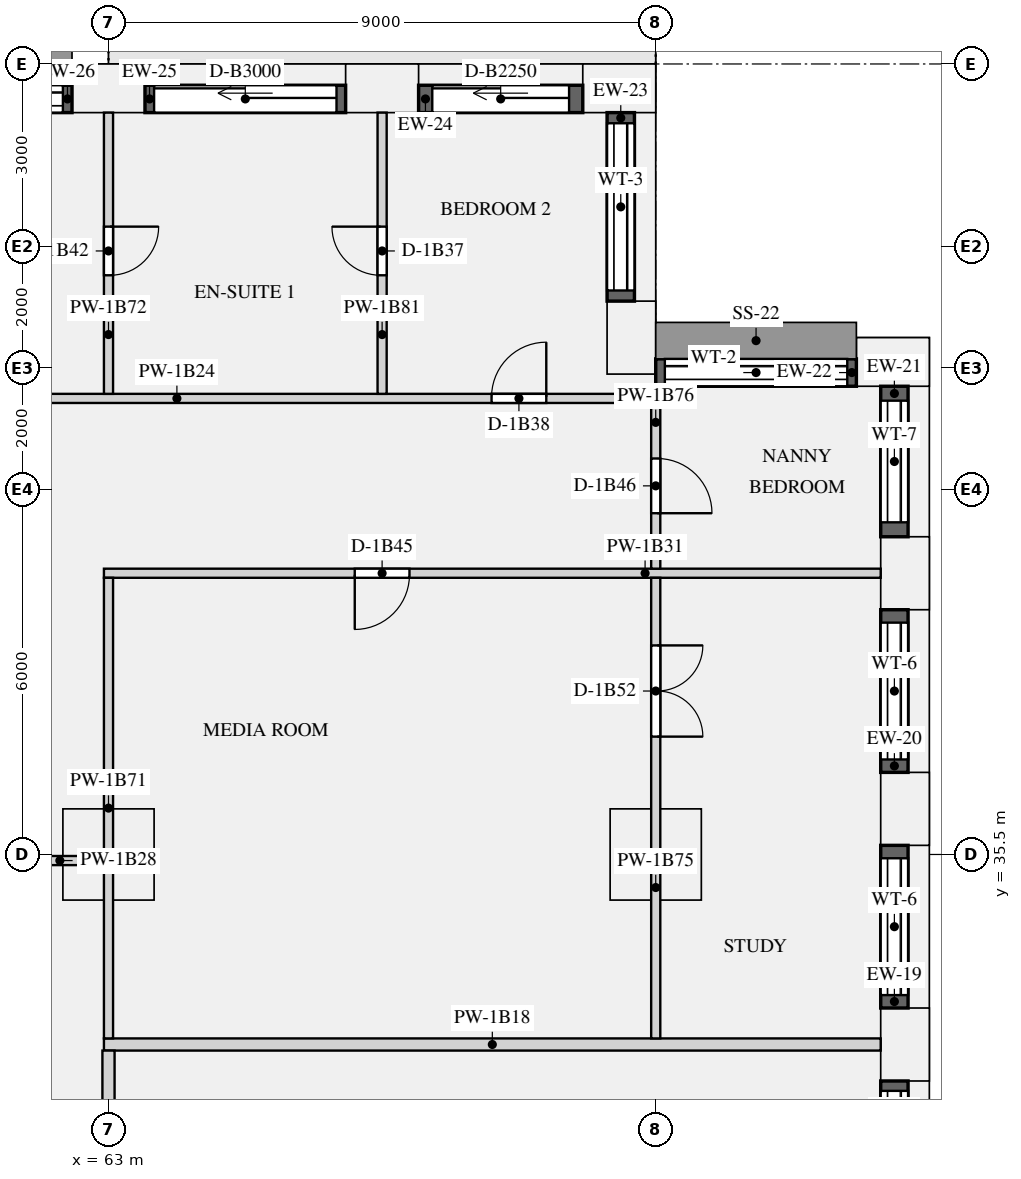
"""IFC4 building model, lengths in metres.
Left out: names, types, materials, properties, quantities, classifications, styles, units other than length and angle.
Written with IfcOpenShell. Run it as: python <this file> out.ifc"""

import sys

from ifc_helpers import new_model, si_unit, direction, frame, frame_2d, origin, origin_2d, place, context, subcontext, project, spatial, rectangle, extrude, element, fill, save


model = new_model("IFC4")
c1 = context("Model", 3, precision=1e-05, world=origin(), true_north=direction((0.0, 1.0)))
c2 = subcontext(c1, "Body", "Model", "MODEL_VIEW")
j1 = project(units=[si_unit("LENGTHUNIT", "METRE"), si_unit("PLANEANGLEUNIT", "RADIAN")], contexts=[c1])
p1 = place(None, origin())
s1 = spatial("IfcSite", under=j1, at=p1, CompositionType="ELEMENT")
p2 = place(p1, origin())
s2 = spatial("IfcBuilding", under=s1, at=p2, CompositionType="ELEMENT")
p3 = place(p2, frame((0.0, 0.0, 28.95)))
s3 = spatial("IfcBuildingStorey", under=s2, at=p3, CompositionType="ELEMENT", Elevation=28.95)
for number, where, z_axis, x_axis in (
    (1, (76.1, 32.375, 0.0), (0.0, 0.0, 1.0), (0.0, 1.0, 0.0)),
    (2, (76.1, 36.25, 0.0), (0.0, 0.0, 1.0), (0.0, 1.0, 0.0)),
    (3, (76.1, 40.125, 0.0), (0.0, 0.0, 1.0), (0.0, 1.0, 0.0)),
    (4, (75.9, 43.6, 0.0), (0.0, 0.0, 1.0), (-1.0, 0.0, 0.0)),
    (5, (71.6, 44.0, 0.0), (0.0, 0.0, 1.0), (0.0, 1.0, 0.0)),
    (6, (71.4, 48.1, 0.0), (0.0, 0.0, 1.0), (-1.0, 0.0, 0.0)),
    (7, (67.5, 48.1, 0.0), (0.0, 0.0, 1.0), (-1.0, 0.0, 0.0)),
    (8, (63.0, 48.1, 0.0), (0.0, 0.0, 1.0), (-1.0, 0.0, 0.0)),
):
    element("IfcColumn", number, at=place(p3, frame(where, z_axis=z_axis, x_axis=x_axis)), inside=s3, PredefinedType="USERDEFINED", context=c2, shape_type="SweptSolid", body=[
        extrude(rectangle(XDim=1.2, YDim=0.8, at=origin_2d()), origin(), (0.0, 0.0, 1.0), 3.15),
    ])
for number, where, z_axis, x_axis in (
    (9, (63.0, 35.5, 0.0), (0.0, 0.0, 1.0), (1.0, 0.0, 0.0)),
    (10, (72.0, 35.5, 0.0), (0.0, 0.0, 1.0), (1.0, 0.0, 0.0)),
):
    element("IfcColumn", number, at=place(p3, frame(where, z_axis=z_axis, x_axis=x_axis)), inside=s3, PredefinedType="COLUMN", context=c2, shape_type="SweptSolid", body=[
        extrude(rectangle(XDim=1.5, YDim=1.5, at=origin_2d()), origin(), (0.0, 0.0, 1.0), 3.15),
    ])
p4 = place(p3, frame((75.925, 29.7, 0.9), z_axis=(0.0, 0.0, 1.0), x_axis=(0.0, 1.0, 0.0)))
e11 = element("IfcWall", 11, at=p4, inside=s3, PredefinedType="SOLIDWALL", context=c2, shape_type="SweptSolid", body=[
    extrude(rectangle(XDim=2.075, YDim=0.45, at=frame_2d((1.038, 0.0))), origin(), (0.0, 0.0, 1.0), 1.93),
])
p5 = place(p4, frame((0.163, 0.0, 0.15)))
e12 = element("IfcOpeningElement", 12, at=p5, cuts=e11, PredefinedType="OPENING", context=c2, shape_type="SweptSolid", body=[
    extrude(rectangle(XDim=1.75, YDim=1.5, at=frame_2d((0.875, 0.75))), frame((0.0, 0.235, 0.0), z_axis=(0.0, -1.0, 0.0), x_axis=(1.0, 0.0, 0.0)), (0.0, 0.0, 1.0), 0.47),
])
p6 = place(p3, frame((75.925, 32.975, 0.9), z_axis=(0.0, 0.0, 1.0), x_axis=(0.0, 1.0, 0.0)))
e13 = element("IfcWall", 13, at=p6, inside=s3, PredefinedType="SOLIDWALL", context=c2, shape_type="SweptSolid", body=[
    extrude(rectangle(XDim=2.675, YDim=0.45, at=frame_2d((1.337, 0.0))), origin(), (0.0, 0.0, 1.0), 1.93),
])
p7 = place(p6, frame((0.212, 0.0, 0.15)))
e14 = element("IfcOpeningElement", 14, at=p7, cuts=e13, PredefinedType="OPENING", context=c2, shape_type="SweptSolid", body=[
    extrude(rectangle(XDim=2.25, YDim=1.5, at=frame_2d((1.125, 0.75))), frame((0.0, 0.235, 0.0), z_axis=(0.0, -1.0, 0.0), x_axis=(1.0, 0.0, 0.0)), (0.0, 0.0, 1.0), 0.47),
])
p8 = place(p3, frame((75.925, 36.85, 0.9), z_axis=(0.0, 0.0, 1.0), x_axis=(0.0, 1.0, 0.0)))
e15 = element("IfcWall", 15, at=p8, inside=s3, PredefinedType="SOLIDWALL", context=c2, shape_type="SweptSolid", body=[
    extrude(rectangle(XDim=2.675, YDim=0.45, at=frame_2d((1.337, 0.0))), origin(), (0.0, 0.0, 1.0), 1.93),
])
p9 = place(p8, frame((0.212, 0.0, 0.15)))
e16 = element("IfcOpeningElement", 16, at=p9, cuts=e15, PredefinedType="OPENING", context=c2, shape_type="SweptSolid", body=[
    extrude(rectangle(XDim=2.25, YDim=1.5, at=frame_2d((1.125, 0.75))), frame((0.0, 0.235, 0.0), z_axis=(0.0, -1.0, 0.0), x_axis=(1.0, 0.0, 0.0)), (0.0, 0.0, 1.0), 0.47),
])
p10 = place(p3, frame((75.925, 40.725, 0.9), z_axis=(0.0, 0.0, 1.0), x_axis=(0.0, 1.0, 0.0)))
e17 = element("IfcWall", 17, at=p10, inside=s3, PredefinedType="SOLIDWALL", context=c2, shape_type="SweptSolid", body=[
    extrude(rectangle(XDim=2.475, YDim=0.45, at=frame_2d((1.237, 0.0))), origin(), (0.0, 0.0, 1.0), 1.93),
])
p11 = place(p10, frame((0.238, 0.0, 0.15)))
e18 = element("IfcOpeningElement", 18, at=p11, cuts=e17, PredefinedType="OPENING", context=c2, shape_type="SweptSolid", body=[
    extrude(rectangle(XDim=2.0, YDim=1.5, at=frame_2d((1.0, 0.75))), frame((0.0, 0.235, 0.0), z_axis=(0.0, -1.0, 0.0), x_axis=(1.0, 0.0, 0.0)), (0.0, 0.0, 1.0), 0.47),
])
p12 = place(p3, frame((75.3, 43.425, 0.9), z_axis=(0.0, 0.0, 1.0), x_axis=(-1.0, 0.0, 0.0)))
e19 = element("IfcWall", 19, at=p12, inside=s3, PredefinedType="SOLIDWALL", context=c2, shape_type="SweptSolid", body=[
    extrude(rectangle(XDim=3.3, YDim=0.45, at=frame_2d((1.65, 0.0))), origin(), (0.0, 0.0, 1.0), 1.93),
])
p13 = place(p12, frame((0.15, 0.0, 0.15)))
e20 = element("IfcOpeningElement", 20, at=p13, cuts=e19, PredefinedType="OPENING", context=c2, shape_type="SweptSolid", body=[
    extrude(rectangle(XDim=3.0, YDim=1.5, at=frame_2d((1.5, 0.75))), frame((0.0, 0.235, 0.0), z_axis=(0.0, -1.0, 0.0), x_axis=(1.0, 0.0, 0.0)), (0.0, 0.0, 1.0), 0.47),
])
p14 = place(p3, frame((71.425, 44.6, 0.9), z_axis=(0.0, 0.0, 1.0), x_axis=(0.0, 1.0, 0.0)))
e21 = element("IfcWall", 21, at=p14, inside=s3, PredefinedType="SOLIDWALL", context=c2, shape_type="SweptSolid", body=[
    extrude(rectangle(XDim=3.1, YDim=0.45, at=frame_2d((1.55, 0.0))), origin(), (0.0, 0.0, 1.0), 1.93),
])
p15 = place(p14, frame((0.175, 0.0, 0.15)))
e22 = element("IfcOpeningElement", 22, at=p15, cuts=e21, PredefinedType="OPENING", context=c2, shape_type="SweptSolid", body=[
    extrude(rectangle(XDim=2.75, YDim=1.5, at=frame_2d((1.375, 0.75))), frame((0.0, 0.235, 0.0), z_axis=(0.0, -1.0, 0.0), x_axis=(1.0, 0.0, 0.0)), (0.0, 0.0, 1.0), 0.47),
])
p16 = place(p3, frame((70.8, 47.925, 0.0), z_axis=(0.0, 0.0, 1.0), x_axis=(-1.0, 0.0, 0.0)))
e23 = element("IfcWall", 23, at=p16, inside=s3, PredefinedType="SOLIDWALL", context=c2, shape_type="SweptSolid", body=[
    extrude(rectangle(XDim=2.7, YDim=0.45, at=frame_2d((1.35, 0.0))), origin(), (0.0, 0.0, 1.0), 2.83),
])
p17 = place(p16, frame((0.225, 0.0, 0.0)))
e24 = element("IfcOpeningElement", 24, at=p17, cuts=e23, PredefinedType="OPENING", context=c2, shape_type="SweptSolid", body=[
    extrude(rectangle(XDim=2.25, YDim=2.3, at=frame_2d((1.125, 1.15))), frame((0.0, 0.235, 0.0), z_axis=(0.0, -1.0, 0.0), x_axis=(1.0, 0.0, 0.0)), (0.0, 0.0, 1.0), 0.47),
])
p18 = place(p3, frame((66.9, 47.925, 0.0), z_axis=(0.0, 0.0, 1.0), x_axis=(-1.0, 0.0, 0.0)))
e25 = element("IfcWall", 25, at=p18, inside=s3, PredefinedType="SOLIDWALL", context=c2, shape_type="SweptSolid", body=[
    extrude(rectangle(XDim=3.3, YDim=0.45, at=frame_2d((1.65, 0.0))), origin(), (0.0, 0.0, 1.0), 2.83),
])
p19 = place(p18, frame((0.15, 0.0, 0.0)))
e26 = element("IfcOpeningElement", 26, at=p19, cuts=e25, PredefinedType="OPENING", context=c2, shape_type="SweptSolid", body=[
    extrude(rectangle(XDim=3.0, YDim=2.3, at=frame_2d((1.5, 1.15))), frame((0.0, 0.235, 0.0), z_axis=(0.0, -1.0, 0.0), x_axis=(1.0, 0.0, 0.0)), (0.0, 0.0, 1.0), 0.47),
])
p20 = place(p3, frame((62.4, 47.925, 0.9), z_axis=(0.0, 0.0, 1.0), x_axis=(-1.0, 0.0, 0.0)))
e27 = element("IfcWall", 27, at=p20, inside=s3, PredefinedType="SOLIDWALL", context=c2, shape_type="SweptSolid", body=[
    extrude(rectangle(XDim=3.3, YDim=0.45, at=frame_2d((1.65, 0.0))), origin(), (0.0, 0.0, 1.0), 1.93),
])
p21 = place(p20, frame((0.15, 0.0, 0.15)))
e28 = element("IfcOpeningElement", 28, at=p21, cuts=e27, PredefinedType="OPENING", context=c2, shape_type="SweptSolid", body=[
    extrude(rectangle(XDim=3.0, YDim=1.5, at=frame_2d((1.5, 0.75))), frame((0.0, 0.235, 0.0), z_axis=(0.0, -1.0, 0.0), x_axis=(1.0, 0.0, 0.0)), (0.0, 0.0, 1.0), 0.47),
])
p22 = place(p3, frame((62.925, 32.375, 0.0), z_axis=(0.0, 0.0, 1.0), x_axis=(1.0, 0.0, 0.0)))
e29 = element("IfcWall", 29, at=p22, inside=s3, PredefinedType="PARTITIONING", context=c2, shape_type="SweptSolid", body=[
    extrude(rectangle(XDim=12.775, YDim=0.2, at=frame_2d((6.387, 0.0))), origin(), (0.0, 0.0, 1.0), 2.83),
])
p23 = place(p3, frame((54.075, 43.0, 0.0), z_axis=(0.0, 0.0, 1.0), x_axis=(1.0, 0.0, 0.0)))
e30 = element("IfcWall", 30, at=p23, inside=s3, PredefinedType="PARTITIONING", context=c2, shape_type="SweptSolid", body=[
    extrude(rectangle(XDim=17.85, YDim=0.15, at=frame_2d((8.925, 0.0))), origin(), (0.0, 0.0, 1.0), 2.83),
])
p24 = place(p23, frame((15.225, 0.0, 0.0)))
e31 = element("IfcOpeningElement", 31, at=p24, cuts=e30, PredefinedType="OPENING", context=c2, shape_type="SweptSolid", body=[
    extrude(rectangle(XDim=0.9, YDim=2.1, at=frame_2d((0.45, 1.05))), frame((0.0, 0.085, 0.0), z_axis=(0.0, -1.0, 0.0), x_axis=(1.0, 0.0, 0.0)), (0.0, 0.0, 1.0), 0.17),
])
p25 = place(p23, frame((3.975, 0.0, 0.0)))
e32 = element("IfcOpeningElement", 32, at=p25, cuts=e30, PredefinedType="OPENING", context=c2, shape_type="SweptSolid", body=[
    extrude(rectangle(XDim=0.9, YDim=2.1, at=frame_2d((0.45, 1.05))), frame((0.0, 0.085, 0.0), z_axis=(0.0, -1.0, 0.0), x_axis=(1.0, 0.0, 0.0)), (0.0, 0.0, 1.0), 0.17),
])
p26 = place(p3, frame((59.8, 35.4, 0.0), z_axis=(0.0, 0.0, 1.0), x_axis=(1.0, 0.0, 0.0)))
e33 = element("IfcWall", 33, at=p26, inside=s3, PredefinedType="PARTITIONING", context=c2, shape_type="SweptSolid", body=[
    extrude(rectangle(XDim=3.125, YDim=0.15, at=frame_2d((1.562, 0.0))), origin(), (0.0, 0.0, 1.0), 2.83),
])
p27 = place(p26, frame((0.775, 0.0, 0.0)))
e34 = element("IfcOpeningElement", 34, at=p27, cuts=e33, PredefinedType="OPENING", context=c2, shape_type="SweptSolid", body=[
    extrude(rectangle(XDim=0.9, YDim=2.1, at=frame_2d((0.45, 1.05))), frame((0.0, 0.085, 0.0), z_axis=(0.0, -1.0, 0.0), x_axis=(1.0, 0.0, 0.0)), (0.0, 0.0, 1.0), 0.17),
])
p28 = place(p3, frame((62.925, 40.125, 0.0), z_axis=(0.0, 0.0, 1.0), x_axis=(1.0, 0.0, 0.0)))
e35 = element("IfcWall", 35, at=p28, inside=s3, PredefinedType="PARTITIONING", context=c2, shape_type="SweptSolid", body=[
    extrude(rectangle(XDim=12.775, YDim=0.15, at=frame_2d((6.387, 0.0))), origin(), (0.0, 0.0, 1.0), 2.83),
])
p29 = place(p28, frame((4.125, 0.0, 0.0)))
e36 = element("IfcOpeningElement", 36, at=p29, cuts=e35, PredefinedType="OPENING", context=c2, shape_type="SweptSolid", body=[
    extrude(rectangle(XDim=0.9, YDim=2.1, at=frame_2d((0.45, 1.05))), frame((0.0, 0.085, 0.0), z_axis=(0.0, -1.0, 0.0), x_axis=(1.0, 0.0, 0.0)), (0.0, 0.0, 1.0), 0.17),
])
p30 = place(p3, frame((63.0, 32.475, 0.0), z_axis=(0.0, 0.0, 1.0), x_axis=(0.0, 1.0, 0.0)))
e37 = element("IfcWall", 37, at=p30, inside=s3, PredefinedType="PARTITIONING", context=c2, shape_type="SweptSolid", body=[
    extrude(rectangle(XDim=7.575, YDim=0.15, at=frame_2d((3.788, 0.0))), origin(), (0.0, 0.0, 1.0), 2.83),
])
p31 = place(p3, frame((63.0, 43.075, 0.0), z_axis=(0.0, 0.0, 1.0), x_axis=(0.0, 1.0, 0.0)))
e38 = element("IfcWall", 38, at=p31, inside=s3, PredefinedType="PARTITIONING", context=c2, shape_type="SweptSolid", body=[
    extrude(rectangle(XDim=4.625, YDim=0.15, at=frame_2d((2.312, 0.0))), origin(), (0.0, 0.0, 1.0), 2.83),
])
p32 = place(p31, frame((1.95, 0.0, 0.0)))
e39 = element("IfcOpeningElement", 39, at=p32, cuts=e38, PredefinedType="OPENING", context=c2, shape_type="SweptSolid", body=[
    extrude(rectangle(XDim=0.8, YDim=2.1, at=frame_2d((0.4, 1.05))), frame((0.0, 0.085, 0.0), z_axis=(0.0, -1.0, 0.0), x_axis=(1.0, 0.0, 0.0)), (0.0, 0.0, 1.0), 0.17),
])
p33 = place(p3, frame((63.0, 28.575, 0.0), z_axis=(0.0, 0.0, 1.0), x_axis=(0.0, 1.0, 0.0)))
e40 = element("IfcWall", 40, at=p33, inside=s3, PredefinedType="PARTITIONING", context=c2, shape_type="SweptSolid", body=[
    extrude(rectangle(XDim=3.7, YDim=0.2, at=frame_2d((1.85, 0.0))), origin(), (0.0, 0.0, 1.0), 2.83),
])
p34 = place(p3, frame((72.0, 32.475, 0.0), z_axis=(0.0, 0.0, 1.0), x_axis=(0.0, 1.0, 0.0)))
e41 = element("IfcWall", 41, at=p34, inside=s3, PredefinedType="PARTITIONING", context=c2, shape_type="SweptSolid", body=[
    extrude(rectangle(XDim=7.575, YDim=0.15, at=frame_2d((3.788, 0.0))), origin(), (0.0, 0.0, 1.0), 2.83),
])
p35 = place(p34, frame((4.963, 0.0, 0.0)))
e42 = element("IfcOpeningElement", 42, at=p35, cuts=e41, PredefinedType="OPENING", context=c2, shape_type="SweptSolid", body=[
    extrude(rectangle(XDim=1.5, YDim=2.1, at=frame_2d((0.75, 1.05))), frame((0.0, 0.085, 0.0), z_axis=(0.0, -1.0, 0.0), x_axis=(1.0, 0.0, 0.0)), (0.0, 0.0, 1.0), 0.17),
])
p36 = place(p3, frame((72.0, 40.2, 0.0), z_axis=(0.0, 0.0, 1.0), x_axis=(0.0, 1.0, 0.0)))
e43 = element("IfcWall", 43, at=p36, inside=s3, PredefinedType="PARTITIONING", context=c2, shape_type="SweptSolid", body=[
    extrude(rectangle(XDim=3.0, YDim=0.15, at=frame_2d((1.5, 0.0))), origin(), (0.0, 0.0, 1.0), 2.83),
])
p37 = place(p36, frame((0.912, 0.0, 0.0)))
e44 = element("IfcOpeningElement", 44, at=p37, cuts=e43, PredefinedType="OPENING", context=c2, shape_type="SweptSolid", body=[
    extrude(rectangle(XDim=0.9, YDim=2.1, at=frame_2d((0.45, 1.05))), frame((0.0, 0.085, 0.0), z_axis=(0.0, -1.0, 0.0), x_axis=(1.0, 0.0, 0.0)), (0.0, 0.0, 1.0), 0.17),
])
p38 = place(p3, frame((67.5, 43.075, 0.0), z_axis=(0.0, 0.0, 1.0), x_axis=(0.0, 1.0, 0.0)))
e45 = element("IfcWall", 45, at=p38, inside=s3, PredefinedType="PARTITIONING", context=c2, shape_type="SweptSolid", body=[
    extrude(rectangle(XDim=4.625, YDim=0.15, at=frame_2d((2.312, 0.0))), origin(), (0.0, 0.0, 1.0), 2.83),
])
p39 = place(p38, frame((1.95, 0.0, 0.0)))
e46 = element("IfcOpeningElement", 46, at=p39, cuts=e45, PredefinedType="OPENING", context=c2, shape_type="SweptSolid", body=[
    extrude(rectangle(XDim=0.8, YDim=2.1, at=frame_2d((0.4, 1.05))), frame((0.0, 0.085, 0.0), z_axis=(0.0, -1.0, 0.0), x_axis=(1.0, 0.0, 0.0)), (0.0, 0.0, 1.0), 0.17),
])
p40 = place(p5, origin())
e47 = element("IfcWindow", 47, at=p40, inside=s3, PartitioningType="SINGLE_PANEL", PredefinedType="WINDOW", context=c2, shape_type="SweptSolid", body=[
    extrude(rectangle(XDim=1.75, YDim=1.5, at=frame_2d((0.875, 0.75))), frame((0.0, -0.065, 0.0), z_axis=(0.0, -1.0, 0.0), x_axis=(1.0, 0.0, 0.0)), (0.0, 0.0, 1.0), 0.06),
])
fill(e12, e47)
p41 = place(p7, origin())
e48 = element("IfcWindow", 48, at=p41, inside=s3, PartitioningType="SINGLE_PANEL", PredefinedType="WINDOW", context=c2, shape_type="SweptSolid", body=[
    extrude(rectangle(XDim=2.25, YDim=1.5, at=frame_2d((1.125, 0.75))), frame((0.0, -0.065, 0.0), z_axis=(0.0, -1.0, 0.0), x_axis=(1.0, 0.0, 0.0)), (0.0, 0.0, 1.0), 0.06),
])
fill(e14, e48)
p42 = place(p9, origin())
e49 = element("IfcWindow", 49, at=p42, inside=s3, PartitioningType="SINGLE_PANEL", PredefinedType="WINDOW", context=c2, shape_type="SweptSolid", body=[
    extrude(rectangle(XDim=2.25, YDim=1.5, at=frame_2d((1.125, 0.75))), frame((0.0, -0.065, 0.0), z_axis=(0.0, -1.0, 0.0), x_axis=(1.0, 0.0, 0.0)), (0.0, 0.0, 1.0), 0.06),
])
fill(e16, e49)
p43 = place(p11, origin())
e50 = element("IfcWindow", 50, at=p43, inside=s3, PartitioningType="SINGLE_PANEL", PredefinedType="WINDOW", context=c2, shape_type="SweptSolid", body=[
    extrude(rectangle(XDim=2.0, YDim=1.5, at=frame_2d((1.0, 0.75))), frame((0.0, -0.065, 0.0), z_axis=(0.0, -1.0, 0.0), x_axis=(1.0, 0.0, 0.0)), (0.0, 0.0, 1.0), 0.06),
])
fill(e18, e50)
p44 = place(p13, origin())
e51 = element("IfcWindow", 51, at=p44, inside=s3, PartitioningType="SINGLE_PANEL", PredefinedType="WINDOW", context=c2, shape_type="SweptSolid", body=[
    extrude(rectangle(XDim=3.0, YDim=1.5, at=frame_2d((1.5, 0.75))), frame((0.0, -0.065, 0.0), z_axis=(0.0, -1.0, 0.0), x_axis=(1.0, 0.0, 0.0)), (0.0, 0.0, 1.0), 0.06),
])
fill(e20, e51)
p45 = place(p15, origin())
e52 = element("IfcWindow", 52, at=p45, inside=s3, PartitioningType="SINGLE_PANEL", PredefinedType="WINDOW", context=c2, shape_type="SweptSolid", body=[
    extrude(rectangle(XDim=2.75, YDim=1.5, at=frame_2d((1.375, 0.75))), frame((0.0, -0.065, 0.0), z_axis=(0.0, -1.0, 0.0), x_axis=(1.0, 0.0, 0.0)), (0.0, 0.0, 1.0), 0.06),
])
fill(e22, e52)
p46 = place(p17, origin())
e53 = element("IfcDoor", 53, at=p46, inside=s3, OperationType="SLIDING_TO_LEFT", PredefinedType="DOOR", context=c2, shape_type="SweptSolid", body=[
    extrude(rectangle(XDim=2.25, YDim=2.3, at=frame_2d((1.125, 1.15))), frame((0.0, -0.07, 0.0), z_axis=(0.0, -1.0, 0.0), x_axis=(1.0, 0.0, 0.0)), (0.0, 0.0, 1.0), 0.05),
])
fill(e24, e53)
p47 = place(p19, origin())
e54 = element("IfcDoor", 54, at=p47, inside=s3, OperationType="SLIDING_TO_LEFT", PredefinedType="DOOR", context=c2, shape_type="SweptSolid", body=[
    extrude(rectangle(XDim=3.0, YDim=2.3, at=frame_2d((1.5, 1.15))), frame((0.0, -0.07, 0.0), z_axis=(0.0, -1.0, 0.0), x_axis=(1.0, 0.0, 0.0)), (0.0, 0.0, 1.0), 0.05),
])
fill(e26, e54)
p48 = place(p21, origin())
e55 = element("IfcWindow", 55, at=p48, inside=s3, PartitioningType="SINGLE_PANEL", PredefinedType="WINDOW", context=c2, shape_type="SweptSolid", body=[
    extrude(rectangle(XDim=3.0, YDim=1.5, at=frame_2d((1.5, 0.75))), frame((0.0, -0.065, 0.0), z_axis=(0.0, -1.0, 0.0), x_axis=(1.0, 0.0, 0.0)), (0.0, 0.0, 1.0), 0.06),
])
fill(e28, e55)
p49 = place(p39, origin())
e56 = element("IfcDoor", 56, at=p49, inside=s3, OperationType="SINGLE_SWING_RIGHT", PredefinedType="DOOR", context=c2, shape_type="SweptSolid", body=[
    extrude(rectangle(XDim=0.8, YDim=2.1, at=frame_2d((0.4, 1.05))), frame((0.0, 0.025, 0.0), z_axis=(0.0, -1.0, 0.0), x_axis=(1.0, 0.0, 0.0)), (0.0, 0.0, 1.0), 0.05),
])
fill(e46, e56)
p50 = place(p24, origin())
e57 = element("IfcDoor", 57, at=p50, inside=s3, OperationType="SINGLE_SWING_RIGHT", PredefinedType="DOOR", context=c2, shape_type="SweptSolid", body=[
    extrude(rectangle(XDim=0.9, YDim=2.1, at=frame_2d((0.45, 1.05))), frame((0.0, 0.025, 0.0), z_axis=(0.0, -1.0, 0.0), x_axis=(1.0, 0.0, 0.0)), (0.0, 0.0, 1.0), 0.05),
])
fill(e31, e57)
p51 = place(p32, frame((0.8, 0.0, 0.0), z_axis=(0.0, 0.0, 1.0), x_axis=(-1.0, 0.0, 0.0)))
e58 = element("IfcDoor", 58, at=p51, inside=s3, OperationType="SINGLE_SWING_LEFT", PredefinedType="DOOR", context=c2, shape_type="SweptSolid", body=[
    extrude(rectangle(XDim=0.8, YDim=2.1, at=frame_2d((0.4, 1.05))), frame((0.0, 0.025, 0.0), z_axis=(0.0, -1.0, 0.0), x_axis=(1.0, 0.0, 0.0)), (0.0, 0.0, 1.0), 0.05),
])
fill(e39, e58)
p52 = place(p29, frame((0.9, 0.0, 0.0), z_axis=(0.0, 0.0, 1.0), x_axis=(-1.0, 0.0, 0.0)))
e59 = element("IfcDoor", 59, at=p52, inside=s3, OperationType="SINGLE_SWING_RIGHT", PredefinedType="DOOR", context=c2, shape_type="SweptSolid", body=[
    extrude(rectangle(XDim=0.9, YDim=2.1, at=frame_2d((0.45, 1.05))), frame((0.0, 0.025, 0.0), z_axis=(0.0, -1.0, 0.0), x_axis=(1.0, 0.0, 0.0)), (0.0, 0.0, 1.0), 0.05),
])
fill(e36, e59)
p53 = place(p37, frame((0.9, 0.0, 0.0), z_axis=(0.0, 0.0, 1.0), x_axis=(-1.0, 0.0, 0.0)))
e60 = element("IfcDoor", 60, at=p53, inside=s3, OperationType="SINGLE_SWING_RIGHT", PredefinedType="DOOR", context=c2, shape_type="SweptSolid", body=[
    extrude(rectangle(XDim=0.9, YDim=2.1, at=frame_2d((0.45, 1.05))), frame((0.0, 0.025, 0.0), z_axis=(0.0, -1.0, 0.0), x_axis=(1.0, 0.0, 0.0)), (0.0, 0.0, 1.0), 0.05),
])
fill(e44, e60)
p54 = place(p35, frame((1.5, 0.0, 0.0), z_axis=(0.0, 0.0, 1.0), x_axis=(-1.0, 0.0, 0.0)))
e61 = element("IfcDoor", 61, at=p54, inside=s3, OperationType="DOUBLE_DOOR_SINGLE_SWING", PredefinedType="DOOR", context=c2, shape_type="SweptSolid", body=[
    extrude(rectangle(XDim=1.5, YDim=2.1, at=frame_2d((0.75, 1.05))), frame((0.0, 0.025, 0.0), z_axis=(0.0, -1.0, 0.0), x_axis=(1.0, 0.0, 0.0)), (0.0, 0.0, 1.0), 0.05),
])
fill(e42, e61)
save(model, sys.argv[1])
